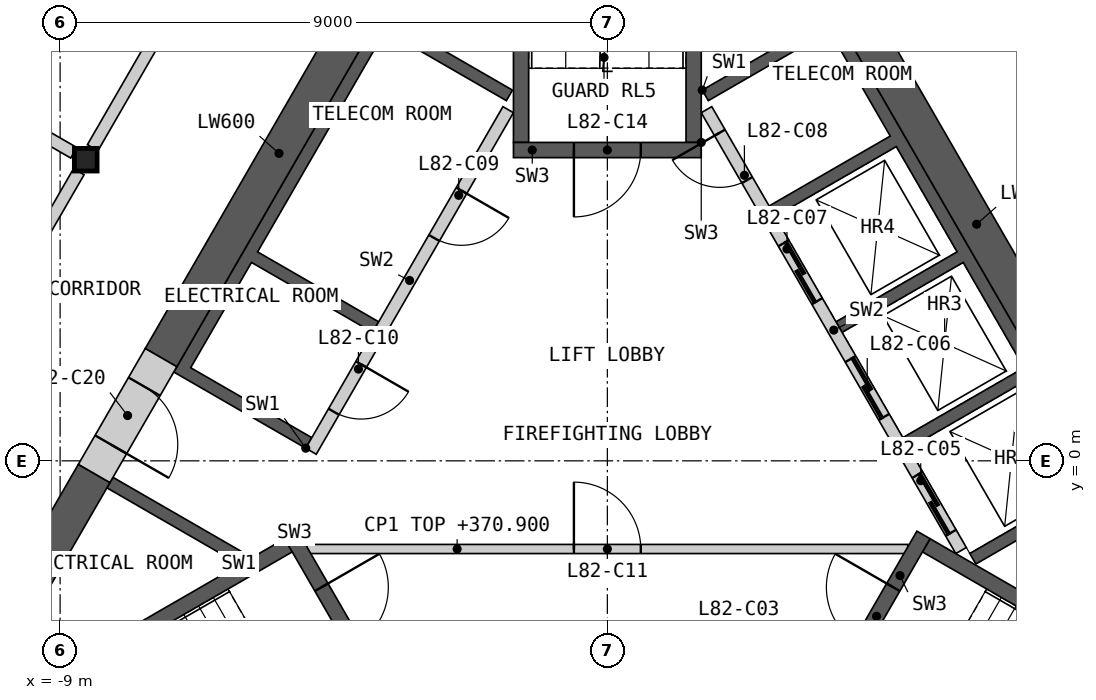
"""IFC4 building model, lengths in metres.
Left out: names, types, materials, properties, quantities, classifications, styles, units other than length and angle.
Written with IfcOpenShell. Run it as: python <this file> out.ifc"""

import sys

from ifc_helpers import new_model, si_unit, direction, frame, frame_2d, origin, origin_2d, place, context, subcontext, project, spatial, polyline, rectangle, i_section, outline, extrude, element, fill, save


model = new_model("IFC4")
c1 = context("Model", 3, precision=1e-05, world=origin(), true_north=direction((0.0, 1.0)))
c2 = subcontext(c1, "Body", "Model", "MODEL_VIEW")
j1 = project(units=[si_unit("LENGTHUNIT", "METRE"), si_unit("PLANEANGLEUNIT", "RADIAN")], contexts=[c1])
p1 = place(None, origin())
s1 = spatial("IfcSite", under=j1, at=p1, CompositionType="ELEMENT")
p2 = place(p1, origin())
s2 = spatial("IfcBuilding", under=s1, at=p2, CompositionType="ELEMENT")
p3 = place(p2, frame((0.0, 0.0, 367.8)))
s3 = spatial("IfcBuildingStorey", under=s2, at=p3, CompositionType="ELEMENT", Elevation=367.8)
p4 = place(p3, frame((-8.578, 4.953, 0.0), z_axis=(0.0, 0.0, 1.0), x_axis=(1.0, 0.0, 0.0)))
e1 = element("IfcColumn", 1, at=p4, inside=s3, PredefinedType="COLUMN", context=c2, shape_type="SweptSolid", body=[
    extrude(i_section(OverallWidth=0.374, OverallDepth=0.372, WebThickness=0.016, FlangeThickness=0.026, at=origin_2d()), origin(), (0.0, 0.0, 1.0), 3.4),
])
p5 = place(p3, origin())
e2 = element("IfcWall", 2, at=p5, inside=s3, PredefinedType="SHEAR", context=c2, shape_type="SweptSolid", body=[
    extrude(outline(polyline([(1.561, 6.097), (3.731, 7.35), (8.231, -0.444), (6.061, -1.697), (5.96, -1.524), (7.952, -0.374), (6.952, 1.358), (4.96, 0.208), (4.861, 0.381), (6.852, 1.531), (5.852, 3.263), (3.861, 2.113), (3.76, 2.287), (5.752, 3.437), (4.752, 5.169), (2.76, 4.019), (2.66, 4.192), (4.652, 5.342), (3.652, 7.074), (1.66, 5.924), (1.561, 6.097)])), origin(), (0.0, 0.0, 1.0), 3.1),
])
p6 = place(p3, frame((5.817, -1.476, 0.0), z_axis=(0.0, 0.0, 1.0), x_axis=(-0.500002616675, 0.866023893041, 0.0)))
e3 = element("IfcWall", 3, at=p6, inside=s3, PredefinedType="SOLIDWALL", context=c2, shape_type="SweptSolid", body=[
    extrude(rectangle(XDim=8.373, YDim=0.2, at=frame_2d((4.187, 0.0))), origin(), (0.0, 0.0, 1.0), 3.1),
])
p7 = place(p6, frame((0.337, 0.0, 0.0)))
e4 = element("IfcOpeningElement", 4, at=p7, cuts=e3, PredefinedType="OPENING", context=c2, shape_type="SweptSolid", body=[
    extrude(rectangle(XDim=1.1, YDim=2.1, at=frame_2d((0.55, 1.05))), frame((0.0, 0.11, 0.0), z_axis=(0.0, -1.0, 0.0), x_axis=(1.0, 0.0, 0.0)), (0.0, 0.0, 1.0), 0.22),
])
p8 = place(p6, frame((2.537, 0.0, 0.0)))
e5 = element("IfcOpeningElement", 5, at=p8, cuts=e3, PredefinedType="OPENING", context=c2, shape_type="SweptSolid", body=[
    extrude(rectangle(XDim=1.1, YDim=2.1, at=frame_2d((0.55, 1.05))), frame((0.0, 0.11, 0.0), z_axis=(0.0, -1.0, 0.0), x_axis=(1.0, 0.0, 0.0)), (0.0, 0.0, 1.0), 0.22),
])
p9 = place(p6, frame((4.737, 0.0, 0.0)))
e6 = element("IfcOpeningElement", 6, at=p9, cuts=e3, PredefinedType="OPENING", context=c2, shape_type="SweptSolid", body=[
    extrude(rectangle(XDim=1.1, YDim=2.1, at=frame_2d((0.55, 1.05))), frame((0.0, 0.11, 0.0), z_axis=(0.0, -1.0, 0.0), x_axis=(1.0, 0.0, 0.0)), (0.0, 0.0, 1.0), 0.22),
])
p10 = place(p6, frame((7.037, 0.0, 0.0)))
e7 = element("IfcOpeningElement", 7, at=p10, cuts=e3, PredefinedType="OPENING", context=c2, shape_type="SweptSolid", body=[
    extrude(rectangle(XDim=0.9, YDim=2.1, at=frame_2d((0.45, 1.05))), frame((0.0, 0.11, 0.0), z_axis=(0.0, -1.0, 0.0), x_axis=(1.0, 0.0, 0.0)), (0.0, 0.0, 1.0), 0.22),
])
p11 = place(p3, origin())
e8 = element("IfcWall", 8, at=p11, inside=s3, PredefinedType="SHEAR", context=c2, shape_type="SweptSolid", body=[
    extrude(outline(polyline([(-6.061, -1.697), (-8.231, -0.444), (-8.131, -0.271), (-5.96, -1.524), (-6.061, -1.697)])), origin(), (0.0, 0.0, 1.0), 3.1),
])
p12 = place(p3, origin())
e9 = element("IfcWall", 9, at=p12, inside=s3, PredefinedType="SHEAR", context=c2, shape_type="SweptSolid", body=[
    extrude(outline(polyline([(-4.96, 0.208), (-7.131, 1.461), (-3.731, 7.35), (-1.561, 6.097), (-1.66, 5.924), (-3.652, 7.074), (-5.752, 3.437), (-3.76, 2.287), (-3.861, 2.113), (-5.852, 3.263), (-6.852, 1.531), (-4.861, 0.381), (-4.96, 0.208)])), origin(), (0.0, 0.0, 1.0), 3.1),
])
p13 = place(p3, frame((-1.631, 5.776, 0.0), z_axis=(0.0, 0.0, 1.0), x_axis=(-0.499992876559, -0.866029516466, 0.0)))
e10 = element("IfcWall", 10, at=p13, inside=s3, PredefinedType="SOLIDWALL", context=c2, shape_type="SweptSolid", body=[
    extrude(rectangle(XDim=6.486, YDim=0.2, at=frame_2d((3.243, 0.0))), origin(), (0.0, 0.0, 1.0), 3.1),
])
p14 = place(p13, frame((1.537, 0.0, 0.0)))
e11 = element("IfcOpeningElement", 11, at=p14, cuts=e10, PredefinedType="OPENING", context=c2, shape_type="SweptSolid", body=[
    extrude(rectangle(XDim=0.9, YDim=2.1, at=frame_2d((0.45, 1.05))), frame((0.0, 0.11, 0.0), z_axis=(0.0, -1.0, 0.0), x_axis=(1.0, 0.0, 0.0)), (0.0, 0.0, 1.0), 0.22),
])
p15 = place(p13, frame((4.837, 0.0, 0.0)))
e12 = element("IfcOpeningElement", 12, at=p15, cuts=e10, PredefinedType="OPENING", context=c2, shape_type="SweptSolid", body=[
    extrude(rectangle(XDim=0.9, YDim=2.1, at=frame_2d((0.45, 1.05))), frame((0.0, 0.11, 0.0), z_axis=(0.0, -1.0, 0.0), x_axis=(1.0, 0.0, 0.0)), (0.0, 0.0, 1.0), 0.22),
])
p16 = place(p3, frame((-4.941, -1.45, 0.0), z_axis=(0.0, 0.0, 1.0), x_axis=(1.0, 0.0, 0.0)))
e13 = element("IfcWall", 13, at=p16, inside=s3, PredefinedType="PARTITIONING", context=c2, shape_type="SweptSolid", body=[
    extrude(rectangle(XDim=9.882, YDim=0.15, at=frame_2d((4.941, 0.0))), origin(), (0.0, 0.0, 1.0), 3.1),
])
p17 = place(p16, frame((4.391, 0.0, 0.0)))
e14 = element("IfcOpeningElement", 14, at=p17, cuts=e13, PredefinedType="OPENING", context=c2, shape_type="SweptSolid", body=[
    extrude(rectangle(XDim=1.1, YDim=2.1, at=frame_2d((0.55, 1.05))), frame((0.0, 0.085, 0.0), z_axis=(0.0, -1.0, 0.0), x_axis=(1.0, 0.0, 0.0)), (0.0, 0.0, 1.0), 0.17),
])
p18 = place(p3, origin())
e15 = element("IfcWall", 15, at=p18, inside=s3, PredefinedType="SHEAR", context=c2, shape_type="SweptSolid", body=[
    extrude(outline(polyline([(-5.307, -1.281), (-10.374, -4.206), (-10.032, -4.298), (-5.182, -1.498), (-5.307, -1.281)])), origin(), (0.0, 0.0, 1.0), 3.1),
])
p19 = place(p3, frame((-5.199, -1.219, 0.0), z_axis=(0.0, 0.0, 1.0), x_axis=(0.499982516597, -0.866035497597, 0.0)))
e16 = element("IfcWall", 16, at=p19, inside=s3, PredefinedType="SHEAR", context=c2, shape_type="SweptSolid", body=[
    extrude(rectangle(XDim=3.088, YDim=0.25, at=frame_2d((1.544, 0.0))), origin(), (0.0, 0.0, 1.0), 3.1),
])
p20 = place(p19, frame((0.994, 0.0, 0.0)))
e17 = element("IfcOpeningElement", 17, at=p20, cuts=e16, PredefinedType="OPENING", context=c2, shape_type="SweptSolid", body=[
    extrude(rectangle(XDim=1.1, YDim=2.1, at=frame_2d((0.55, 1.05))), frame((0.0, 0.135, 0.0), z_axis=(0.0, -1.0, 0.0), x_axis=(1.0, 0.0, 0.0)), (0.0, 0.0, 1.0), 0.27),
])
p21 = place(p3, origin())
e18 = element("IfcWall", 18, at=p21, inside=s3, PredefinedType="SHEAR", context=c2, shape_type="SweptSolid", body=[
    extrude(outline(polyline([(10.032, -4.298), (10.374, -4.206), (5.307, -1.281), (5.182, -1.498), (10.032, -4.298)])), origin(), (0.0, 0.0, 1.0), 3.1),
])
p22 = place(p3, frame((3.655, -3.893, 0.0), z_axis=(0.0, 0.0, 1.0), x_axis=(0.499982516597, 0.866035497597, 0.0)))
e19 = element("IfcWall", 19, at=p22, inside=s3, PredefinedType="SHEAR", context=c2, shape_type="SweptSolid", body=[
    extrude(rectangle(XDim=3.088, YDim=0.25, at=frame_2d((1.544, 0.0))), origin(), (0.0, 0.0, 1.0), 3.1),
])
p23 = place(p22, frame((0.994, 0.0, 0.0)))
e20 = element("IfcOpeningElement", 20, at=p23, cuts=e19, PredefinedType="OPENING", context=c2, shape_type="SweptSolid", body=[
    extrude(rectangle(XDim=1.1, YDim=2.1, at=frame_2d((0.55, 1.05))), frame((0.0, 0.135, 0.0), z_axis=(0.0, -1.0, 0.0), x_axis=(1.0, 0.0, 0.0)), (0.0, 0.0, 1.0), 0.27),
])
p24 = place(p3, origin())
e21 = element("IfcWall", 21, at=p24, inside=s3, PredefinedType="SHEAR", context=c2, shape_type="SweptSolid", body=[
    extrude(outline(polyline([(1.544, 5.237), (1.544, 11.087), (1.294, 10.837), (1.294, 5.237), (1.544, 5.237)])), origin(), (0.0, 0.0, 1.0), 3.1),
])
p25 = place(p3, origin())
e22 = element("IfcWall", 22, at=p25, inside=s3, PredefinedType="SHEAR", context=c2, shape_type="SweptSolid", body=[
    extrude(outline(polyline([(-1.294, 10.837), (-1.544, 11.087), (-1.544, 5.237), (-1.294, 5.237), (-1.294, 10.837)])), origin(), (0.0, 0.0, 1.0), 3.1),
])
p26 = place(p3, frame((1.544, 5.112, 0.0), z_axis=(0.0, 0.0, 1.0), x_axis=(-1.0, 0.0, 0.0)))
e23 = element("IfcWall", 23, at=p26, inside=s3, PredefinedType="SHEAR", context=c2, shape_type="SweptSolid", body=[
    extrude(rectangle(XDim=3.088, YDim=0.25, at=frame_2d((1.544, 0.0))), origin(), (0.0, 0.0, 1.0), 3.1),
])
p27 = place(p26, frame((0.994, 0.0, 0.0)))
e24 = element("IfcOpeningElement", 24, at=p27, cuts=e23, PredefinedType="OPENING", context=c2, shape_type="SweptSolid", body=[
    extrude(rectangle(XDim=1.1, YDim=2.1, at=frame_2d((0.55, 1.05))), frame((0.0, 0.135, 0.0), z_axis=(0.0, -1.0, 0.0), x_axis=(1.0, 0.0, 0.0)), (0.0, 0.0, 1.0), 0.27),
])
p28 = place(p3, frame((8.686, -0.634, 0.0), z_axis=(0.0, 0.0, 1.0), x_axis=(-0.50001836461, 0.866014800712, 0.0)))
e25 = element("IfcWall", 25, at=p28, inside=s3, PredefinedType="SHEAR", context=c2, shape_type="SweptSolid", body=[
    extrude(rectangle(XDim=10.451, YDim=0.6, at=frame_2d((5.225, 0.0))), origin(), (0.0, 0.0, 1.0), 3.1),
])
p29 = place(p3, frame((-3.461, 8.417, 0.0), z_axis=(0.0, 0.0, 1.0), x_axis=(-0.50000391502, -0.866023143435, 0.0)))
e26 = element("IfcWall", 26, at=p29, inside=s3, PredefinedType="SHEAR", context=c2, shape_type="SweptSolid", body=[
    extrude(rectangle(XDim=7.759, YDim=0.6, at=frame_2d((3.879, 0.0))), origin(), (0.0, 0.0, 1.0), 3.1),
])
p30 = place(p3, frame((-8.44, -0.208, 0.0), z_axis=(0.0, 0.0, 1.0), x_axis=(-0.500007425856, -0.866021116422, 0.0)))
e27 = element("IfcWall", 27, at=p30, inside=s3, PredefinedType="SHEAR", context=c2, shape_type="SweptSolid", body=[
    extrude(rectangle(XDim=4.969, YDim=0.6, at=frame_2d((2.484, 0.0))), origin(), (0.0, 0.0, 1.0), 3.1),
])
p31 = place(p3, frame((-7.34, 1.698, 0.0), z_axis=(0.0, 0.0, 1.0), x_axis=(-0.50002983664, -0.866008176907, 0.0)))
e28 = element("IfcWall", 28, at=p31, inside=s3, PredefinedType="SHEAR", context=c2, shape_type="SweptSolid", body=[
    extrude(rectangle(XDim=2.2, YDim=0.6, at=frame_2d((1.1, 0.0))), origin(), (0.0, 0.0, 1.0), 3.1),
])
p32 = place(p31, frame((0.55, 0.0, 0.0)))
e29 = element("IfcOpeningElement", 29, at=p32, cuts=e28, PredefinedType="OPENING", context=c2, shape_type="SweptSolid", body=[
    extrude(rectangle(XDim=1.1, YDim=2.1, at=frame_2d((0.55, 1.05))), frame((0.0, 0.31, 0.0), z_axis=(0.0, -1.0, 0.0), x_axis=(1.0, 0.0, 0.0)), (0.0, 0.0, 1.0), 0.62),
])
p33 = place(p3, frame((-8.465, 5.15, 0.0), z_axis=(0.0, 0.0, 1.0), x_axis=(0.499992155518, 0.866029932751, 0.0)))
e30 = element("IfcWall", 30, at=p33, inside=s3, PredefinedType="PARTITIONING", context=c2, shape_type="SweptSolid", body=[
    extrude(rectangle(XDim=8.123, YDim=0.2, at=frame_2d((4.062, 0.0))), origin(), (0.0, 0.0, 1.0), 3.1),
])
p34 = place(p33, frame((3.587, 0.0, 0.0)))
e31 = element("IfcOpeningElement", 31, at=p34, cuts=e30, PredefinedType="OPENING", context=c2, shape_type="SweptSolid", body=[
    extrude(rectangle(XDim=0.95, YDim=2.1, at=frame_2d((0.475, 1.05))), frame((0.0, 0.11, 0.0), z_axis=(0.0, -1.0, 0.0), x_axis=(1.0, 0.0, 0.0)), (0.0, 0.0, 1.0), 0.22),
])
p35 = place(p3, frame((4.403, 12.185, 0.0), z_axis=(0.0, 0.0, 1.0), x_axis=(0.499992155518, -0.866029932751, 0.0)))
e32 = element("IfcWall", 32, at=p35, inside=s3, PredefinedType="PARTITIONING", context=c2, shape_type="SweptSolid", body=[
    extrude(rectangle(XDim=8.123, YDim=0.2, at=frame_2d((4.062, 0.0))), origin(), (0.0, 0.0, 1.0), 3.1),
])
p36 = place(p35, frame((3.762, 0.0, 0.0)))
e33 = element("IfcOpeningElement", 33, at=p36, cuts=e32, PredefinedType="OPENING", context=c2, shape_type="SweptSolid", body=[
    extrude(rectangle(XDim=1.0, YDim=2.1, at=frame_2d((0.5, 1.05))), frame((0.0, 0.11, 0.0), z_axis=(0.0, -1.0, 0.0), x_axis=(1.0, 0.0, 0.0)), (0.0, 0.0, 1.0), 0.22),
])
p37 = place(p3, frame((-12.754, -2.279, 0.0), z_axis=(0.0, 0.0, 1.0), x_axis=(0.500001682468, 0.866024432409, 0.0)))
e34 = element("IfcWall", 34, at=p37, inside=s3, PredefinedType="PARTITIONING", context=c2, shape_type="SweptSolid", body=[
    extrude(rectangle(XDim=8.124, YDim=0.2, at=frame_2d((4.062, 0.0))), origin(), (0.0, 0.0, 1.0), 3.1),
])
p38 = place(p37, frame((3.762, 0.0, 0.0)))
e35 = element("IfcOpeningElement", 35, at=p38, cuts=e34, PredefinedType="OPENING", context=c2, shape_type="SweptSolid", body=[
    extrude(rectangle(XDim=1.0, YDim=2.1, at=frame_2d((0.5, 1.05))), frame((0.0, 0.11, 0.0), z_axis=(0.0, -1.0, 0.0), x_axis=(1.0, 0.0, 0.0)), (0.0, 0.0, 1.0), 0.22),
])
p39 = place(p3, frame((-11.473, 6.74, 0.0), z_axis=(0.0, 0.0, 1.0), x_axis=(0.499993542657, 0.866029131901, 0.0)))
e36 = element("IfcWall", 36, at=p39, inside=s3, PredefinedType="PARTITIONING", context=c2, shape_type="SweptSolid", body=[
    extrude(rectangle(XDim=14.994, YDim=0.2, at=frame_2d((7.497, 0.0))), origin(), (0.0, 0.0, 1.0), 2.33),
])
p40 = place(p39, frame((10.383, 0.0, 0.0)))
e37 = element("IfcOpeningElement", 37, at=p40, cuts=e36, PredefinedType="OPENING", context=c2, shape_type="SweptSolid", body=[
    extrude(rectangle(XDim=0.95, YDim=2.1, at=frame_2d((0.475, 1.05))), frame((0.0, 0.11, 0.0), z_axis=(0.0, -1.0, 0.0), x_axis=(1.0, 0.0, 0.0)), (0.0, 0.0, 1.0), 0.22),
])
p41 = place(p3, frame((-18.869, 10.894, 0.0), z_axis=(0.0, 0.0, 1.0), x_axis=(0.866023724155, -0.500002909193, 0.0)))
e38 = element("IfcWall", 38, at=p41, inside=s3, PredefinedType="PARTITIONING", context=c2, shape_type="SweptSolid", body=[
    extrude(rectangle(XDim=11.655, YDim=0.2, at=frame_2d((5.827, 0.0))), origin(), (0.0, 0.0, 1.0), 2.33),
])
p42 = place(p7, origin())
e39 = element("IfcDoor", 39, at=p42, inside=s3, OperationType="SLIDING_TO_LEFT", PredefinedType="DOOR", context=c2, shape_type="SweptSolid", body=[
    extrude(rectangle(XDim=1.1, YDim=2.1, at=frame_2d((0.55, 1.05))), frame((0.0, 0.025, 0.0), z_axis=(0.0, -1.0, 0.0), x_axis=(1.0, 0.0, 0.0)), (0.0, 0.0, 1.0), 0.05),
])
fill(e4, e39)
p43 = place(p8, origin())
e40 = element("IfcDoor", 40, at=p43, inside=s3, OperationType="SLIDING_TO_LEFT", PredefinedType="DOOR", context=c2, shape_type="SweptSolid", body=[
    extrude(rectangle(XDim=1.1, YDim=2.1, at=frame_2d((0.55, 1.05))), frame((0.0, 0.025, 0.0), z_axis=(0.0, -1.0, 0.0), x_axis=(1.0, 0.0, 0.0)), (0.0, 0.0, 1.0), 0.05),
])
fill(e5, e40)
p44 = place(p9, origin())
e41 = element("IfcDoor", 41, at=p44, inside=s3, OperationType="SLIDING_TO_LEFT", PredefinedType="DOOR", context=c2, shape_type="SweptSolid", body=[
    extrude(rectangle(XDim=1.1, YDim=2.1, at=frame_2d((0.55, 1.05))), frame((0.0, 0.025, 0.0), z_axis=(0.0, -1.0, 0.0), x_axis=(1.0, 0.0, 0.0)), (0.0, 0.0, 1.0), 0.05),
])
fill(e6, e41)
p45 = place(p10, origin())
e42 = element("IfcDoor", 42, at=p45, inside=s3, OperationType="SINGLE_SWING_RIGHT", PredefinedType="DOOR", context=c2, shape_type="SweptSolid", body=[
    extrude(rectangle(XDim=0.9, YDim=2.1, at=frame_2d((0.45, 1.05))), frame((0.0, 0.025, 0.0), z_axis=(0.0, -1.0, 0.0), x_axis=(1.0, 0.0, 0.0)), (0.0, 0.0, 1.0), 0.05),
])
fill(e7, e42)
p46 = place(p14, origin())
e43 = element("IfcDoor", 43, at=p46, inside=s3, OperationType="SINGLE_SWING_LEFT", PredefinedType="DOOR", context=c2, shape_type="SweptSolid", body=[
    extrude(rectangle(XDim=0.9, YDim=2.1, at=frame_2d((0.45, 1.05))), frame((0.0, 0.025, 0.0), z_axis=(0.0, -1.0, 0.0), x_axis=(1.0, 0.0, 0.0)), (0.0, 0.0, 1.0), 0.05),
])
fill(e11, e43)
p47 = place(p15, origin())
e44 = element("IfcDoor", 44, at=p47, inside=s3, OperationType="SINGLE_SWING_LEFT", PredefinedType="DOOR", context=c2, shape_type="SweptSolid", body=[
    extrude(rectangle(XDim=0.9, YDim=2.1, at=frame_2d((0.45, 1.05))), frame((0.0, 0.025, 0.0), z_axis=(0.0, -1.0, 0.0), x_axis=(1.0, 0.0, 0.0)), (0.0, 0.0, 1.0), 0.05),
])
fill(e12, e44)
p48 = place(p17, origin())
e45 = element("IfcDoor", 45, at=p48, inside=s3, OperationType="SINGLE_SWING_LEFT", PredefinedType="DOOR", context=c2, shape_type="SweptSolid", body=[
    extrude(rectangle(XDim=1.1, YDim=2.1, at=frame_2d((0.55, 1.05))), frame((0.0, 0.025, 0.0), z_axis=(0.0, -1.0, 0.0), x_axis=(1.0, 0.0, 0.0)), (0.0, 0.0, 1.0), 0.05),
])
fill(e14, e45)
p49 = place(p20, origin())
e46 = element("IfcDoor", 46, at=p49, inside=s3, OperationType="SINGLE_SWING_LEFT", PredefinedType="DOOR", context=c2, shape_type="SweptSolid", body=[
    extrude(rectangle(XDim=1.1, YDim=2.1, at=frame_2d((0.55, 1.05))), frame((0.0, 0.025, 0.0), z_axis=(0.0, -1.0, 0.0), x_axis=(1.0, 0.0, 0.0)), (0.0, 0.0, 1.0), 0.05),
])
fill(e17, e46)
p50 = place(p23, origin())
e47 = element("IfcDoor", 47, at=p50, inside=s3, OperationType="SINGLE_SWING_RIGHT", PredefinedType="DOOR", context=c2, shape_type="SweptSolid", body=[
    extrude(rectangle(XDim=1.1, YDim=2.1, at=frame_2d((0.55, 1.05))), frame((0.0, 0.025, 0.0), z_axis=(0.0, -1.0, 0.0), x_axis=(1.0, 0.0, 0.0)), (0.0, 0.0, 1.0), 0.05),
])
fill(e20, e47)
p51 = place(p27, origin())
e48 = element("IfcDoor", 48, at=p51, inside=s3, OperationType="SINGLE_SWING_RIGHT", PredefinedType="DOOR", context=c2, shape_type="SweptSolid", body=[
    extrude(rectangle(XDim=1.1, YDim=2.1, at=frame_2d((0.55, 1.05))), frame((0.0, 0.025, 0.0), z_axis=(0.0, -1.0, 0.0), x_axis=(1.0, 0.0, 0.0)), (0.0, 0.0, 1.0), 0.05),
])
fill(e24, e48)
p52 = place(p32, origin())
e49 = element("IfcDoor", 49, at=p52, inside=s3, OperationType="SINGLE_SWING_RIGHT", PredefinedType="DOOR", context=c2, shape_type="SweptSolid", body=[
    extrude(rectangle(XDim=1.1, YDim=2.1, at=frame_2d((0.55, 1.05))), frame((0.0, 0.055, 0.0), z_axis=(0.0, -1.0, 0.0), x_axis=(1.0, 0.0, 0.0)), (0.0, 0.0, 1.0), 0.05),
])
fill(e29, e49)
save(model, sys.argv[1])
